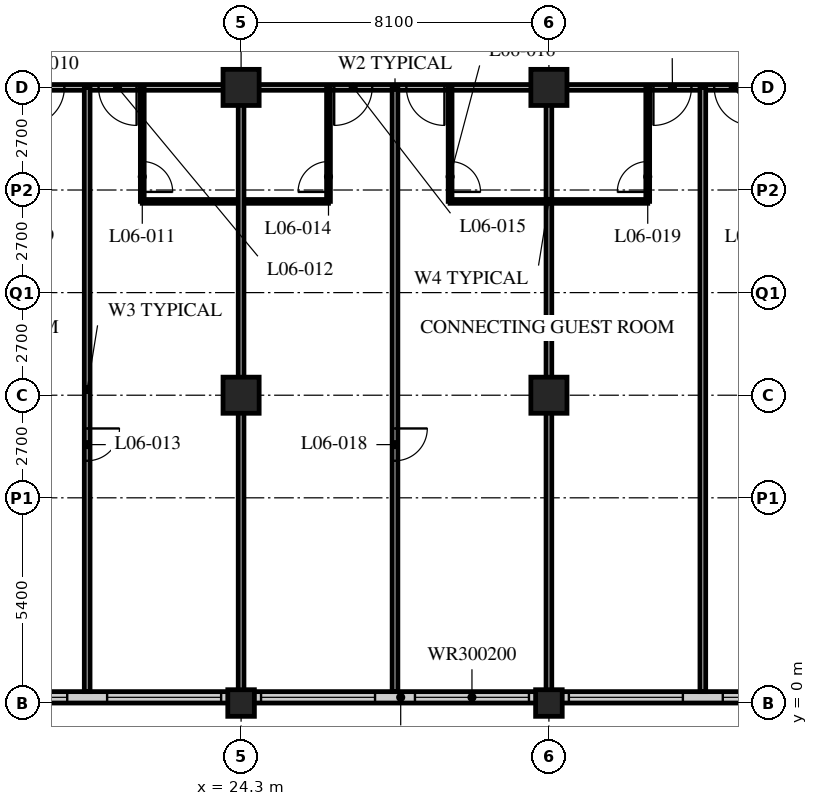
"""IFC4 building model, lengths in metres.
Left out: names, types, materials, properties, quantities, classifications, styles, units other than length and angle.
Written with IfcOpenShell. Run it as: python <this file> out.ifc"""

import sys

from ifc_helpers import new_model, si_unit, direction, frame, frame_2d, origin, origin_2d, place, context, subcontext, project, spatial, rectangle, hollow_rectangle, extrude, element, fill, save


model = new_model("IFC4")
c1 = context("Model", 3, precision=1e-05, world=origin(), true_north=direction((0.0, 1.0)))
c2 = subcontext(c1, "Body", "Model", "MODEL_VIEW")
j1 = project(units=[si_unit("LENGTHUNIT", "METRE"), si_unit("PLANEANGLEUNIT", "RADIAN")], contexts=[c1])
p1 = place(None, origin())
s1 = spatial("IfcSite", under=j1, at=p1, CompositionType="ELEMENT")
p2 = place(p1, origin())
s2 = spatial("IfcBuilding", under=s1, at=p2, CompositionType="ELEMENT")
p3 = place(p2, frame((0.0, 0.0, 33.0)))
s3 = spatial("IfcBuildingStorey", under=s2, at=p3, CompositionType="ELEMENT", Elevation=33.0)
p4 = place(p3, frame((24.3, 0.0, 0.0), z_axis=(0.0, 0.0, 1.0), x_axis=(1.0, 0.0, 0.0)))
e1 = element("IfcColumn", 1, at=p4, inside=s3, PredefinedType="COLUMN", context=c2, shape_type="SweptSolid", body=[
    extrude(hollow_rectangle(XDim=0.7, YDim=0.7, WallThickness=0.06, at=origin_2d()), origin(), (0.0, 0.0, 1.0), 3.4),
])
for number, where, z_axis, x_axis in (
    (2, (24.3, 8.1, 0.0), (0.0, 0.0, 1.0), (1.0, 0.0, 0.0)),
    (3, (24.3, 16.2, 0.0), (0.0, 0.0, 1.0), (1.0, 0.0, 0.0)),
):
    element("IfcColumn", number, at=place(p3, frame(where, z_axis=z_axis, x_axis=x_axis)), inside=s3, PredefinedType="COLUMN", context=c2, shape_type="SweptSolid", body=[
        extrude(hollow_rectangle(XDim=0.95, YDim=0.95, WallThickness=0.095, at=origin_2d()), origin(), (0.0, 0.0, 1.0), 3.4),
    ])
p5 = place(p3, frame((32.4, 0.0, 0.0), z_axis=(0.0, 0.0, 1.0), x_axis=(1.0, 0.0, 0.0)))
e4 = element("IfcColumn", 4, at=p5, inside=s3, PredefinedType="COLUMN", context=c2, shape_type="SweptSolid", body=[
    extrude(hollow_rectangle(XDim=0.7, YDim=0.7, WallThickness=0.06, at=origin_2d()), origin(), (0.0, 0.0, 1.0), 3.4),
])
for number, where, z_axis, x_axis in (
    (5, (32.4, 8.1, 0.0), (0.0, 0.0, 1.0), (1.0, 0.0, 0.0)),
    (6, (32.4, 16.2, 0.0), (0.0, 0.0, 1.0), (1.0, 0.0, 0.0)),
):
    element("IfcColumn", number, at=place(p3, frame(where, z_axis=z_axis, x_axis=x_axis)), inside=s3, PredefinedType="COLUMN", context=c2, shape_type="SweptSolid", body=[
        extrude(hollow_rectangle(XDim=0.95, YDim=0.95, WallThickness=0.095, at=origin_2d()), origin(), (0.0, 0.0, 1.0), 3.4),
    ])
p6 = place(p3, frame((8.4, 0.15, 0.0), z_axis=(0.0, 0.0, 1.0), x_axis=(1.0, 0.0, 0.0)))
e7 = element("IfcWall", 7, at=p6, inside=s3, PredefinedType="SOLIDWALL", context=c2, shape_type="SweptSolid", body=[
    extrude(rectangle(XDim=40.2, YDim=0.3, at=frame_2d((20.1, 0.0))), origin(), (0.0, 0.0, 1.0), 3.19),
])
p7 = place(p6, frame((0.225, 0.0, 0.9)))
e8 = element("IfcOpeningElement", 8, at=p7, cuts=e7, PredefinedType="OPENING", context=c2, shape_type="SweptSolid", body=[
    extrude(rectangle(XDim=3.0, YDim=2.0, at=frame_2d((1.5, 1.0))), frame((0.0, 0.16, 0.0), z_axis=(0.0, -1.0, 0.0), x_axis=(1.0, 0.0, 0.0)), (0.0, 0.0, 1.0), 0.32),
])
p8 = place(p6, frame((4.275, 0.0, 0.9)))
e9 = element("IfcOpeningElement", 9, at=p8, cuts=e7, PredefinedType="OPENING", context=c2, shape_type="SweptSolid", body=[
    extrude(rectangle(XDim=3.0, YDim=2.0, at=frame_2d((1.5, 1.0))), frame((0.0, 0.16, 0.0), z_axis=(0.0, -1.0, 0.0), x_axis=(1.0, 0.0, 0.0)), (0.0, 0.0, 1.0), 0.32),
])
p9 = place(p6, frame((8.325, 0.0, 0.9)))
e10 = element("IfcOpeningElement", 10, at=p9, cuts=e7, PredefinedType="OPENING", context=c2, shape_type="SweptSolid", body=[
    extrude(rectangle(XDim=3.0, YDim=2.0, at=frame_2d((1.5, 1.0))), frame((0.0, 0.16, 0.0), z_axis=(0.0, -1.0, 0.0), x_axis=(1.0, 0.0, 0.0)), (0.0, 0.0, 1.0), 0.32),
])
p10 = place(p6, frame((12.375, 0.0, 0.9)))
e11 = element("IfcOpeningElement", 11, at=p10, cuts=e7, PredefinedType="OPENING", context=c2, shape_type="SweptSolid", body=[
    extrude(rectangle(XDim=3.0, YDim=2.0, at=frame_2d((1.5, 1.0))), frame((0.0, 0.16, 0.0), z_axis=(0.0, -1.0, 0.0), x_axis=(1.0, 0.0, 0.0)), (0.0, 0.0, 1.0), 0.32),
])
p11 = place(p6, frame((16.425, 0.0, 0.9)))
e12 = element("IfcOpeningElement", 12, at=p11, cuts=e7, PredefinedType="OPENING", context=c2, shape_type="SweptSolid", body=[
    extrude(rectangle(XDim=3.0, YDim=2.0, at=frame_2d((1.5, 1.0))), frame((0.0, 0.16, 0.0), z_axis=(0.0, -1.0, 0.0), x_axis=(1.0, 0.0, 0.0)), (0.0, 0.0, 1.0), 0.32),
])
p12 = place(p6, frame((20.475, 0.0, 0.9)))
e13 = element("IfcOpeningElement", 13, at=p12, cuts=e7, PredefinedType="OPENING", context=c2, shape_type="SweptSolid", body=[
    extrude(rectangle(XDim=3.0, YDim=2.0, at=frame_2d((1.5, 1.0))), frame((0.0, 0.16, 0.0), z_axis=(0.0, -1.0, 0.0), x_axis=(1.0, 0.0, 0.0)), (0.0, 0.0, 1.0), 0.32),
])
p13 = place(p6, frame((24.525, 0.0, 0.9)))
e14 = element("IfcOpeningElement", 14, at=p13, cuts=e7, PredefinedType="OPENING", context=c2, shape_type="SweptSolid", body=[
    extrude(rectangle(XDim=3.0, YDim=2.0, at=frame_2d((1.5, 1.0))), frame((0.0, 0.16, 0.0), z_axis=(0.0, -1.0, 0.0), x_axis=(1.0, 0.0, 0.0)), (0.0, 0.0, 1.0), 0.32),
])
p14 = place(p6, frame((28.575, 0.0, 0.9)))
e15 = element("IfcOpeningElement", 15, at=p14, cuts=e7, PredefinedType="OPENING", context=c2, shape_type="SweptSolid", body=[
    extrude(rectangle(XDim=3.0, YDim=2.0, at=frame_2d((1.5, 1.0))), frame((0.0, 0.16, 0.0), z_axis=(0.0, -1.0, 0.0), x_axis=(1.0, 0.0, 0.0)), (0.0, 0.0, 1.0), 0.32),
])
p15 = place(p6, frame((32.625, 0.0, 0.9)))
e16 = element("IfcOpeningElement", 16, at=p15, cuts=e7, PredefinedType="OPENING", context=c2, shape_type="SweptSolid", body=[
    extrude(rectangle(XDim=3.0, YDim=2.0, at=frame_2d((1.5, 1.0))), frame((0.0, 0.16, 0.0), z_axis=(0.0, -1.0, 0.0), x_axis=(1.0, 0.0, 0.0)), (0.0, 0.0, 1.0), 0.32),
])
p16 = place(p6, frame((36.675, 0.0, 0.9)))
e17 = element("IfcOpeningElement", 17, at=p16, cuts=e7, PredefinedType="OPENING", context=c2, shape_type="SweptSolid", body=[
    extrude(rectangle(XDim=3.0, YDim=2.0, at=frame_2d((1.5, 1.0))), frame((0.0, 0.16, 0.0), z_axis=(0.0, -1.0, 0.0), x_axis=(1.0, 0.0, 0.0)), (0.0, 0.0, 1.0), 0.32),
])
p17 = place(p3, frame((12.15, 16.2, 0.0), z_axis=(0.0, 0.0, 1.0), x_axis=(1.0, 0.0, 0.0)))
e18 = element("IfcWall", 18, at=p17, inside=s3, PredefinedType="PARTITIONING", context=c2, shape_type="SweptSolid", body=[
    extrude(rectangle(XDim=32.4, YDim=0.15, at=frame_2d((16.2, 0.0))), origin(), (0.0, 0.0, 1.0), 2.578),
])
p18 = place(p17, frame((6.5, 0.0, 0.0)))
e19 = element("IfcOpeningElement", 19, at=p18, cuts=e18, PredefinedType="OPENING", context=c2, shape_type="SweptSolid", body=[
    extrude(rectangle(XDim=1.0, YDim=2.1, at=frame_2d((0.5, 1.05))), frame((0.0, 0.085, 0.0), z_axis=(0.0, -1.0, 0.0), x_axis=(1.0, 0.0, 0.0)), (0.0, 0.0, 1.0), 0.17),
])
p19 = place(p17, frame((8.4, 0.0, 0.0)))
e20 = element("IfcOpeningElement", 20, at=p19, cuts=e18, PredefinedType="OPENING", context=c2, shape_type="SweptSolid", body=[
    extrude(rectangle(XDim=1.0, YDim=2.1, at=frame_2d((0.5, 1.05))), frame((0.0, 0.085, 0.0), z_axis=(0.0, -1.0, 0.0), x_axis=(1.0, 0.0, 0.0)), (0.0, 0.0, 1.0), 0.17),
])
p20 = place(p17, frame((14.6, 0.0, 0.0)))
e21 = element("IfcOpeningElement", 21, at=p20, cuts=e18, PredefinedType="OPENING", context=c2, shape_type="SweptSolid", body=[
    extrude(rectangle(XDim=1.0, YDim=2.1, at=frame_2d((0.5, 1.05))), frame((0.0, 0.085, 0.0), z_axis=(0.0, -1.0, 0.0), x_axis=(1.0, 0.0, 0.0)), (0.0, 0.0, 1.0), 0.17),
])
p21 = place(p17, frame((16.5, 0.0, 0.0)))
e22 = element("IfcOpeningElement", 22, at=p21, cuts=e18, PredefinedType="OPENING", context=c2, shape_type="SweptSolid", body=[
    extrude(rectangle(XDim=1.0, YDim=2.1, at=frame_2d((0.5, 1.05))), frame((0.0, 0.085, 0.0), z_axis=(0.0, -1.0, 0.0), x_axis=(1.0, 0.0, 0.0)), (0.0, 0.0, 1.0), 0.17),
])
p22 = place(p17, frame((23.0, 0.0, 0.0)))
e23 = element("IfcOpeningElement", 23, at=p22, cuts=e18, PredefinedType="OPENING", context=c2, shape_type="SweptSolid", body=[
    extrude(rectangle(XDim=1.0, YDim=2.1, at=frame_2d((0.5, 1.05))), frame((0.0, 0.085, 0.0), z_axis=(0.0, -1.0, 0.0), x_axis=(1.0, 0.0, 0.0)), (0.0, 0.0, 1.0), 0.17),
])
p23 = place(p17, frame((24.6, 0.0, 0.0)))
e24 = element("IfcOpeningElement", 24, at=p23, cuts=e18, PredefinedType="OPENING", context=c2, shape_type="SweptSolid", body=[
    extrude(rectangle(XDim=1.0, YDim=2.1, at=frame_2d((0.5, 1.05))), frame((0.0, 0.085, 0.0), z_axis=(0.0, -1.0, 0.0), x_axis=(1.0, 0.0, 0.0)), (0.0, 0.0, 1.0), 0.17),
])
p24 = place(p17, frame((1.525, 0.0, 0.0)))
e25 = element("IfcOpeningElement", 25, at=p24, cuts=e18, PredefinedType="OPENING", context=c2, shape_type="SweptSolid", body=[
    extrude(rectangle(XDim=1.0, YDim=2.1, at=frame_2d((0.5, 1.05))), frame((0.0, 0.085, 0.0), z_axis=(0.0, -1.0, 0.0), x_axis=(1.0, 0.0, 0.0)), (0.0, 0.0, 1.0), 0.17),
])
p25 = place(p17, frame((29.875, 0.0, 0.0)))
e26 = element("IfcOpeningElement", 26, at=p25, cuts=e18, PredefinedType="OPENING", context=c2, shape_type="SweptSolid", body=[
    extrude(rectangle(XDim=1.0, YDim=2.1, at=frame_2d((0.5, 1.05))), frame((0.0, 0.085, 0.0), z_axis=(0.0, -1.0, 0.0), x_axis=(1.0, 0.0, 0.0)), (0.0, 0.0, 1.0), 0.17),
])
p26 = place(p3, frame((21.7, 13.2, 0.0), z_axis=(0.0, 0.0, 1.0), x_axis=(1.0, 0.0, 0.0)))
e27 = element("IfcWall", 27, at=p26, inside=s3, PredefinedType="PARTITIONING", context=c2, shape_type="SweptSolid", body=[
    extrude(rectangle(XDim=4.9, YDim=0.1, at=frame_2d((2.45, 0.0))), origin(), (0.0, 0.0, 1.0), 3.19),
])
p27 = place(p3, frame((21.7, 16.2, 0.0), z_axis=(0.0, 0.0, 1.0), x_axis=(0.0, -1.0, 0.0)))
e28 = element("IfcWall", 28, at=p27, inside=s3, PredefinedType="PARTITIONING", context=c2, shape_type="SweptSolid", body=[
    extrude(rectangle(XDim=3.0, YDim=0.1, at=frame_2d((1.5, 0.0))), origin(), (0.0, 0.0, 1.0), 3.19),
])
p28 = place(p27, frame((1.95, 0.0, 0.0)))
e29 = element("IfcOpeningElement", 29, at=p28, cuts=e28, PredefinedType="OPENING", context=c2, shape_type="SweptSolid", body=[
    extrude(rectangle(XDim=0.8, YDim=2.1, at=frame_2d((0.4, 1.05))), frame((0.0, 0.06, 0.0), z_axis=(0.0, -1.0, 0.0), x_axis=(1.0, 0.0, 0.0)), (0.0, 0.0, 1.0), 0.12),
])
p29 = place(p3, frame((20.25, 16.2, 0.0), z_axis=(0.0, 0.0, 1.0), x_axis=(0.0, -1.0, 0.0)))
e30 = element("IfcWall", 30, at=p29, inside=s3, PredefinedType="PARTITIONING", context=c2, shape_type="SweptSolid", body=[
    extrude(rectangle(XDim=15.9, YDim=0.15, at=frame_2d((7.95, 0.0))), origin(), (0.0, 0.0, 1.0), 3.19),
])
p30 = place(p29, frame((8.975, 0.0, 0.0)))
e31 = element("IfcOpeningElement", 31, at=p30, cuts=e30, PredefinedType="OPENING", context=c2, shape_type="SweptSolid", body=[
    extrude(rectangle(XDim=0.85, YDim=2.1, at=frame_2d((0.425, 1.05))), frame((0.0, 0.085, 0.0), z_axis=(0.0, -1.0, 0.0), x_axis=(1.0, 0.0, 0.0)), (0.0, 0.0, 1.0), 0.17),
])
p31 = place(p3, frame((24.3, 16.2, 0.0), z_axis=(0.0, 0.0, 1.0), x_axis=(0.0, -1.0, 0.0)))
e32 = element("IfcWall", 32, at=p31, inside=s3, PredefinedType="PARTITIONING", context=c2, shape_type="SweptSolid", body=[
    extrude(rectangle(XDim=15.9, YDim=0.15, at=frame_2d((7.95, 0.0))), origin(), (0.0, 0.0, 1.0), 2.578),
])
p32 = place(p3, frame((26.6, 16.2, 0.0), z_axis=(0.0, 0.0, 1.0), x_axis=(0.0, -1.0, 0.0)))
e33 = element("IfcWall", 33, at=p32, inside=s3, PredefinedType="PARTITIONING", context=c2, shape_type="SweptSolid", body=[
    extrude(rectangle(XDim=3.0, YDim=0.1, at=frame_2d((1.5, 0.0))), origin(), (0.0, 0.0, 1.0), 3.19),
])
p33 = place(p32, frame((1.95, 0.0, 0.0)))
e34 = element("IfcOpeningElement", 34, at=p33, cuts=e33, PredefinedType="OPENING", context=c2, shape_type="SweptSolid", body=[
    extrude(rectangle(XDim=0.8, YDim=2.1, at=frame_2d((0.4, 1.05))), frame((0.0, 0.06, 0.0), z_axis=(0.0, -1.0, 0.0), x_axis=(1.0, 0.0, 0.0)), (0.0, 0.0, 1.0), 0.12),
])
p34 = place(p3, frame((29.8, 13.2, 0.0), z_axis=(0.0, 0.0, 1.0), x_axis=(1.0, 0.0, 0.0)))
e35 = element("IfcWall", 35, at=p34, inside=s3, PredefinedType="PARTITIONING", context=c2, shape_type="SweptSolid", body=[
    extrude(rectangle(XDim=5.2, YDim=0.1, at=frame_2d((2.6, 0.0))), origin(), (0.0, 0.0, 1.0), 3.19),
])
p35 = place(p3, frame((29.8, 16.2, 0.0), z_axis=(0.0, 0.0, 1.0), x_axis=(0.0, -1.0, 0.0)))
e36 = element("IfcWall", 36, at=p35, inside=s3, PredefinedType="PARTITIONING", context=c2, shape_type="SweptSolid", body=[
    extrude(rectangle(XDim=3.0, YDim=0.1, at=frame_2d((1.5, 0.0))), origin(), (0.0, 0.0, 1.0), 3.19),
])
p36 = place(p35, frame((1.95, 0.0, 0.0)))
e37 = element("IfcOpeningElement", 37, at=p36, cuts=e36, PredefinedType="OPENING", context=c2, shape_type="SweptSolid", body=[
    extrude(rectangle(XDim=0.8, YDim=2.1, at=frame_2d((0.4, 1.05))), frame((0.0, 0.06, 0.0), z_axis=(0.0, -1.0, 0.0), x_axis=(1.0, 0.0, 0.0)), (0.0, 0.0, 1.0), 0.12),
])
p37 = place(p3, frame((28.35, 16.2, 0.0), z_axis=(0.0, 0.0, 1.0), x_axis=(0.0, -1.0, 0.0)))
e38 = element("IfcWall", 38, at=p37, inside=s3, PredefinedType="PARTITIONING", context=c2, shape_type="SweptSolid", body=[
    extrude(rectangle(XDim=15.9, YDim=0.15, at=frame_2d((7.95, 0.0))), origin(), (0.0, 0.0, 1.0), 3.19),
])
p38 = place(p37, frame((8.975, 0.0, 0.0)))
e39 = element("IfcOpeningElement", 39, at=p38, cuts=e38, PredefinedType="OPENING", context=c2, shape_type="SweptSolid", body=[
    extrude(rectangle(XDim=0.85, YDim=2.1, at=frame_2d((0.425, 1.05))), frame((0.0, 0.085, 0.0), z_axis=(0.0, -1.0, 0.0), x_axis=(1.0, 0.0, 0.0)), (0.0, 0.0, 1.0), 0.17),
])
p39 = place(p3, frame((32.4, 16.2, 0.0), z_axis=(0.0, 0.0, 1.0), x_axis=(0.0, -1.0, 0.0)))
e40 = element("IfcWall", 40, at=p39, inside=s3, PredefinedType="PARTITIONING", context=c2, shape_type="SweptSolid", body=[
    extrude(rectangle(XDim=15.9, YDim=0.15, at=frame_2d((7.95, 0.0))), origin(), (0.0, 0.0, 1.0), 2.578),
])
p40 = place(p3, frame((35.0, 16.2, 0.0), z_axis=(0.0, 0.0, 1.0), x_axis=(0.0, -1.0, 0.0)))
e41 = element("IfcWall", 41, at=p40, inside=s3, PredefinedType="PARTITIONING", context=c2, shape_type="SweptSolid", body=[
    extrude(rectangle(XDim=3.0, YDim=0.1, at=frame_2d((1.5, 0.0))), origin(), (0.0, 0.0, 1.0), 3.19),
])
p41 = place(p40, frame((1.95, 0.0, 0.0)))
e42 = element("IfcOpeningElement", 42, at=p41, cuts=e41, PredefinedType="OPENING", context=c2, shape_type="SweptSolid", body=[
    extrude(rectangle(XDim=0.8, YDim=2.1, at=frame_2d((0.4, 1.05))), frame((0.0, 0.06, 0.0), z_axis=(0.0, -1.0, 0.0), x_axis=(1.0, 0.0, 0.0)), (0.0, 0.0, 1.0), 0.12),
])
p42 = place(p3, frame((36.45, 16.2, 0.0), z_axis=(0.0, 0.0, 1.0), x_axis=(0.0, -1.0, 0.0)))
e43 = element("IfcWall", 43, at=p42, inside=s3, PredefinedType="PARTITIONING", context=c2, shape_type="SweptSolid", body=[
    extrude(rectangle(XDim=15.9, YDim=0.15, at=frame_2d((7.95, 0.0))), origin(), (0.0, 0.0, 1.0), 3.19),
])
p43 = place(p9, origin())
e44 = element("IfcWindow", 44, at=p43, inside=s3, PartitioningType="SINGLE_PANEL", PredefinedType="WINDOW", context=c2, shape_type="SweptSolid", body=[
    extrude(rectangle(XDim=3.0, YDim=2.0, at=frame_2d((1.5, 1.0))), frame((0.0, 0.03, 0.0), z_axis=(0.0, -1.0, 0.0), x_axis=(1.0, 0.0, 0.0)), (0.0, 0.0, 1.0), 0.06),
])
fill(e10, e44)
p44 = place(p10, origin())
e45 = element("IfcWindow", 45, at=p44, inside=s3, PartitioningType="SINGLE_PANEL", PredefinedType="WINDOW", context=c2, shape_type="SweptSolid", body=[
    extrude(rectangle(XDim=3.0, YDim=2.0, at=frame_2d((1.5, 1.0))), frame((0.0, 0.03, 0.0), z_axis=(0.0, -1.0, 0.0), x_axis=(1.0, 0.0, 0.0)), (0.0, 0.0, 1.0), 0.06),
])
fill(e11, e45)
p45 = place(p11, origin())
e46 = element("IfcWindow", 46, at=p45, inside=s3, PartitioningType="SINGLE_PANEL", PredefinedType="WINDOW", context=c2, shape_type="SweptSolid", body=[
    extrude(rectangle(XDim=3.0, YDim=2.0, at=frame_2d((1.5, 1.0))), frame((0.0, 0.03, 0.0), z_axis=(0.0, -1.0, 0.0), x_axis=(1.0, 0.0, 0.0)), (0.0, 0.0, 1.0), 0.06),
])
fill(e12, e46)
p46 = place(p12, origin())
e47 = element("IfcWindow", 47, at=p46, inside=s3, PartitioningType="SINGLE_PANEL", PredefinedType="WINDOW", context=c2, shape_type="SweptSolid", body=[
    extrude(rectangle(XDim=3.0, YDim=2.0, at=frame_2d((1.5, 1.0))), frame((0.0, 0.03, 0.0), z_axis=(0.0, -1.0, 0.0), x_axis=(1.0, 0.0, 0.0)), (0.0, 0.0, 1.0), 0.06),
])
fill(e13, e47)
p47 = place(p13, origin())
e48 = element("IfcWindow", 48, at=p47, inside=s3, PartitioningType="SINGLE_PANEL", PredefinedType="WINDOW", context=c2, shape_type="SweptSolid", body=[
    extrude(rectangle(XDim=3.0, YDim=2.0, at=frame_2d((1.5, 1.0))), frame((0.0, 0.03, 0.0), z_axis=(0.0, -1.0, 0.0), x_axis=(1.0, 0.0, 0.0)), (0.0, 0.0, 1.0), 0.06),
])
fill(e14, e48)
p48 = place(p14, origin())
e49 = element("IfcWindow", 49, at=p48, inside=s3, PartitioningType="SINGLE_PANEL", PredefinedType="WINDOW", context=c2, shape_type="SweptSolid", body=[
    extrude(rectangle(XDim=3.0, YDim=2.0, at=frame_2d((1.5, 1.0))), frame((0.0, 0.03, 0.0), z_axis=(0.0, -1.0, 0.0), x_axis=(1.0, 0.0, 0.0)), (0.0, 0.0, 1.0), 0.06),
])
fill(e15, e49)
p49 = place(p18, origin())
e50 = element("IfcDoor", 50, at=p49, inside=s3, OperationType="SINGLE_SWING_RIGHT", PredefinedType="DOOR", context=c2, shape_type="SweptSolid", body=[
    extrude(rectangle(XDim=1.0, YDim=2.1, at=frame_2d((0.5, 1.05))), frame((0.0, 0.025, 0.0), z_axis=(0.0, -1.0, 0.0), x_axis=(1.0, 0.0, 0.0)), (0.0, 0.0, 1.0), 0.05),
])
fill(e19, e50)
p50 = place(p28, origin())
e51 = element("IfcDoor", 51, at=p50, inside=s3, OperationType="SINGLE_SWING_RIGHT", PredefinedType="DOOR", context=c2, shape_type="SweptSolid", body=[
    extrude(rectangle(XDim=0.8, YDim=2.1, at=frame_2d((0.4, 1.05))), frame((0.0, 0.025, 0.0), z_axis=(0.0, -1.0, 0.0), x_axis=(1.0, 0.0, 0.0)), (0.0, 0.0, 1.0), 0.05),
])
fill(e29, e51)
p51 = place(p19, origin())
e52 = element("IfcDoor", 52, at=p51, inside=s3, OperationType="SINGLE_SWING_LEFT", PredefinedType="DOOR", context=c2, shape_type="SweptSolid", body=[
    extrude(rectangle(XDim=1.0, YDim=2.1, at=frame_2d((0.5, 1.05))), frame((0.0, 0.025, 0.0), z_axis=(0.0, -1.0, 0.0), x_axis=(1.0, 0.0, 0.0)), (0.0, 0.0, 1.0), 0.05),
])
fill(e20, e52)
p52 = place(p30, origin())
e53 = element("IfcDoor", 53, at=p52, inside=s3, OperationType="SINGLE_SWING_LEFT", PredefinedType="DOOR", context=c2, shape_type="SweptSolid", body=[
    extrude(rectangle(XDim=0.85, YDim=2.1, at=frame_2d((0.425, 1.05))), frame((0.0, 0.025, 0.0), z_axis=(0.0, -1.0, 0.0), x_axis=(1.0, 0.0, 0.0)), (0.0, 0.0, 1.0), 0.05),
])
fill(e31, e53)
p53 = place(p33, origin())
e54 = element("IfcDoor", 54, at=p53, inside=s3, OperationType="SINGLE_SWING_LEFT", PredefinedType="DOOR", context=c2, shape_type="SweptSolid", body=[
    extrude(rectangle(XDim=0.8, YDim=2.1, at=frame_2d((0.4, 1.05))), frame((0.0, 0.025, 0.0), z_axis=(0.0, -1.0, 0.0), x_axis=(1.0, 0.0, 0.0)), (0.0, 0.0, 1.0), 0.05),
])
fill(e34, e54)
p54 = place(p20, origin())
e55 = element("IfcDoor", 55, at=p54, inside=s3, OperationType="SINGLE_SWING_RIGHT", PredefinedType="DOOR", context=c2, shape_type="SweptSolid", body=[
    extrude(rectangle(XDim=1.0, YDim=2.1, at=frame_2d((0.5, 1.05))), frame((0.0, 0.025, 0.0), z_axis=(0.0, -1.0, 0.0), x_axis=(1.0, 0.0, 0.0)), (0.0, 0.0, 1.0), 0.05),
])
fill(e21, e55)
p55 = place(p36, origin())
e56 = element("IfcDoor", 56, at=p55, inside=s3, OperationType="SINGLE_SWING_RIGHT", PredefinedType="DOOR", context=c2, shape_type="SweptSolid", body=[
    extrude(rectangle(XDim=0.8, YDim=2.1, at=frame_2d((0.4, 1.05))), frame((0.0, 0.025, 0.0), z_axis=(0.0, -1.0, 0.0), x_axis=(1.0, 0.0, 0.0)), (0.0, 0.0, 1.0), 0.05),
])
fill(e37, e56)
p56 = place(p21, origin())
e57 = element("IfcDoor", 57, at=p56, inside=s3, OperationType="SINGLE_SWING_LEFT", PredefinedType="DOOR", context=c2, shape_type="SweptSolid", body=[
    extrude(rectangle(XDim=1.0, YDim=2.1, at=frame_2d((0.5, 1.05))), frame((0.0, 0.025, 0.0), z_axis=(0.0, -1.0, 0.0), x_axis=(1.0, 0.0, 0.0)), (0.0, 0.0, 1.0), 0.05),
])
fill(e22, e57)
p57 = place(p38, origin())
e58 = element("IfcDoor", 58, at=p57, inside=s3, OperationType="SINGLE_SWING_LEFT", PredefinedType="DOOR", context=c2, shape_type="SweptSolid", body=[
    extrude(rectangle(XDim=0.85, YDim=2.1, at=frame_2d((0.425, 1.05))), frame((0.0, 0.025, 0.0), z_axis=(0.0, -1.0, 0.0), x_axis=(1.0, 0.0, 0.0)), (0.0, 0.0, 1.0), 0.05),
])
fill(e39, e58)
p58 = place(p41, origin())
e59 = element("IfcDoor", 59, at=p58, inside=s3, OperationType="SINGLE_SWING_LEFT", PredefinedType="DOOR", context=c2, shape_type="SweptSolid", body=[
    extrude(rectangle(XDim=0.8, YDim=2.1, at=frame_2d((0.4, 1.05))), frame((0.0, 0.025, 0.0), z_axis=(0.0, -1.0, 0.0), x_axis=(1.0, 0.0, 0.0)), (0.0, 0.0, 1.0), 0.05),
])
fill(e42, e59)
p59 = place(p22, origin())
e60 = element("IfcDoor", 60, at=p59, inside=s3, OperationType="SINGLE_SWING_RIGHT", PredefinedType="DOOR", context=c2, shape_type="SweptSolid", body=[
    extrude(rectangle(XDim=1.0, YDim=2.1, at=frame_2d((0.5, 1.05))), frame((0.0, 0.025, 0.0), z_axis=(0.0, -1.0, 0.0), x_axis=(1.0, 0.0, 0.0)), (0.0, 0.0, 1.0), 0.05),
])
fill(e23, e60)
p60 = place(p23, origin())
e61 = element("IfcDoor", 61, at=p60, inside=s3, OperationType="SINGLE_SWING_LEFT", PredefinedType="DOOR", context=c2, shape_type="SweptSolid", body=[
    extrude(rectangle(XDim=1.0, YDim=2.1, at=frame_2d((0.5, 1.05))), frame((0.0, 0.025, 0.0), z_axis=(0.0, -1.0, 0.0), x_axis=(1.0, 0.0, 0.0)), (0.0, 0.0, 1.0), 0.05),
])
fill(e24, e61)
save(model, sys.argv[1])
